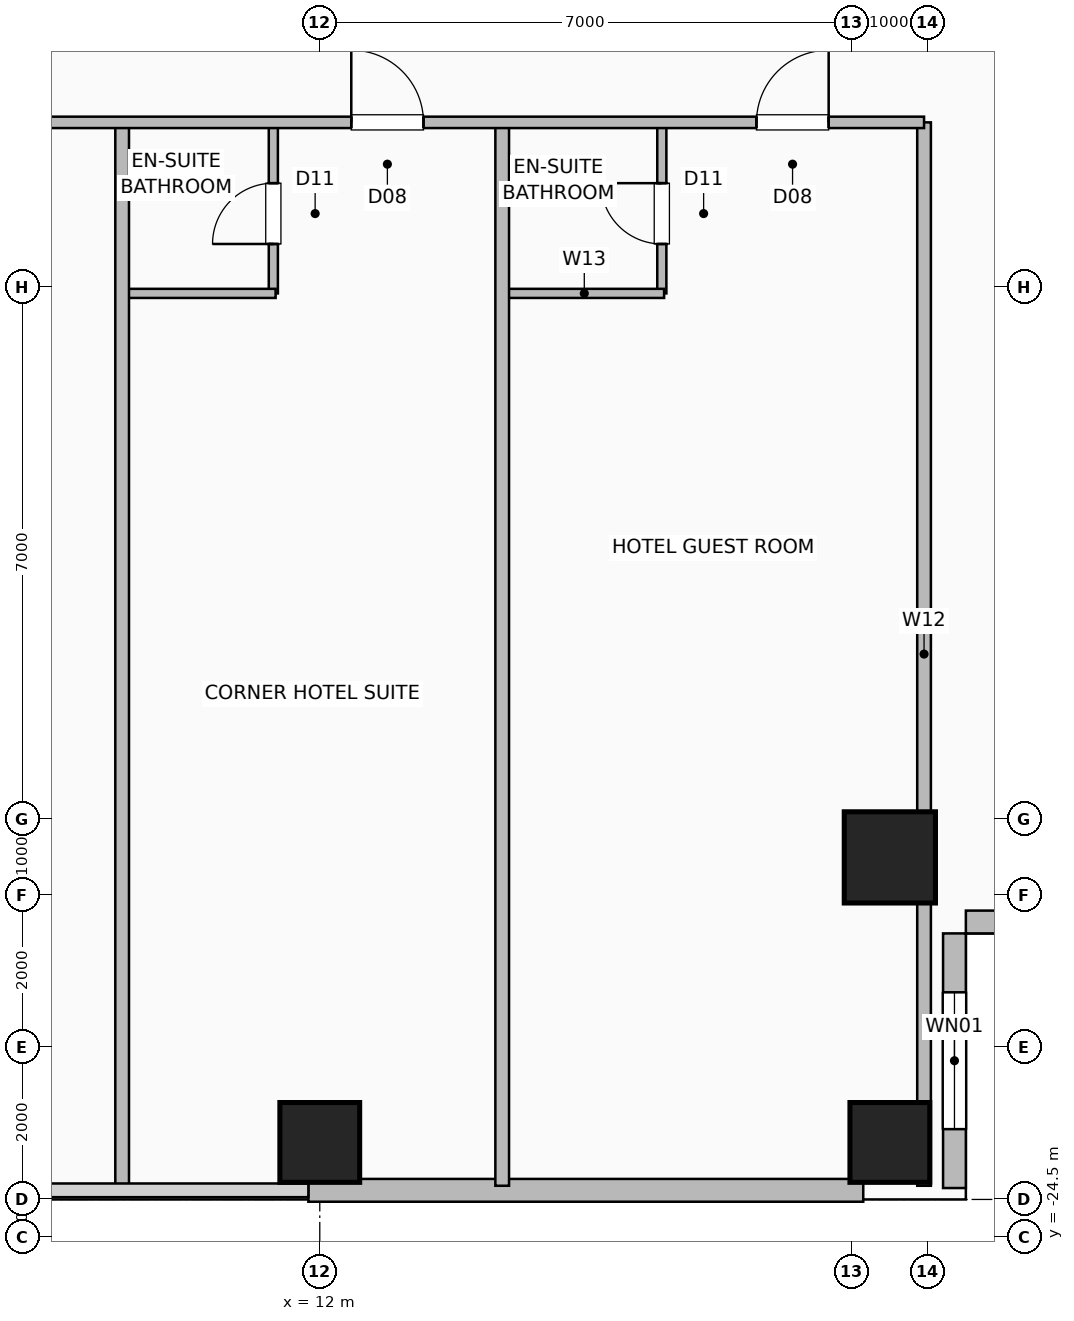
"""IFC4 building model, lengths in metres.
Left out: names, types, materials, properties, quantities, classifications, styles, units other than length and angle.
Written with IfcOpenShell. Run it as: python <this file> out.ifc"""

import sys

from ifc_helpers import new_model, si_unit, direction, frame, frame_2d, origin, origin_2d, place, context, subcontext, project, spatial, rectangle, hollow_rectangle, extrude, element, fill, save


model = new_model("IFC4")
c1 = context("Model", 3, precision=1e-05, world=origin(), true_north=direction((0.0, 1.0)))
c2 = subcontext(c1, "Body", "Model", "MODEL_VIEW")
j1 = project(units=[si_unit("LENGTHUNIT", "METRE"), si_unit("PLANEANGLEUNIT", "RADIAN")], contexts=[c1])
p1 = place(None, origin())
s1 = spatial("IfcSite", under=j1, at=p1, CompositionType="ELEMENT")
p2 = place(p1, origin())
s2 = spatial("IfcBuilding", under=s1, at=p2, CompositionType="ELEMENT")
p3 = place(p2, frame((0.0, 0.0, 65.5)))
s3 = spatial("IfcBuildingStorey", under=s2, at=p3, CompositionType="ELEMENT", Elevation=65.5)
for number, where, z_axis, x_axis in (
    (1, (12.0, -23.25, 0.0), (0.0, 0.0, 1.0), (1.0, 0.0, 0.0)),
    (2, (19.5, -23.25, 0.0), (0.0, 0.0, 1.0), (1.0, 0.0, 0.0)),
):
    element("IfcColumn", number, at=place(p3, frame(where, z_axis=z_axis, x_axis=x_axis)), inside=s3, PredefinedType="COLUMN", context=c2, shape_type="SweptSolid", body=[
        extrude(hollow_rectangle(XDim=1.05, YDim=1.05, WallThickness=0.05, at=origin_2d()), origin(), (0.0, 0.0, 1.0), 3.5),
    ])
p4 = place(p3, frame((19.5, -19.5, 0.0), z_axis=(0.0, 0.0, 1.0), x_axis=(1.0, 0.0, 0.0)))
e3 = element("IfcColumn", 3, at=p4, inside=s3, PredefinedType="COLUMN", context=c2, shape_type="SweptSolid", body=[
    extrude(hollow_rectangle(XDim=1.2, YDim=1.2, WallThickness=0.055, at=origin_2d()), origin(), (0.0, 0.0, 1.0), 3.5),
])
p5 = place(p3, frame((11.85, -23.88, 0.0), z_axis=(0.0, 0.0, 1.0), x_axis=(1.0, 0.0, 0.0)))
e4 = element("IfcWall", 4, at=p5, inside=s3, PredefinedType="SOLIDWALL", context=c2, shape_type="SweptSolid", body=[
    extrude(rectangle(XDim=7.3, YDim=0.3, at=frame_2d((3.65, 0.0))), origin(), (0.0, 0.0, 1.0), 3.25),
])
p6 = place(p3, frame((20.35, -23.85, 0.0), z_axis=(0.0, 0.0, 1.0), x_axis=(0.0, 1.0, 0.0)))
e5 = element("IfcWall", 5, at=p6, inside=s3, PredefinedType="SOLIDWALL", context=c2, shape_type="SweptSolid", body=[
    extrude(rectangle(XDim=3.35, YDim=0.3, at=frame_2d((1.675, 0.0))), origin(), (0.0, 0.0, 1.0), 3.25),
])
p7 = place(p6, frame((0.775, 0.0, 0.9)))
e6 = element("IfcOpeningElement", 6, at=p7, cuts=e5, PredefinedType="OPENING", context=c2, shape_type="SweptSolid", body=[
    extrude(rectangle(XDim=1.8, YDim=1.8, at=frame_2d((0.9, 0.9))), frame((0.0, 0.16, 0.0), z_axis=(0.0, -1.0, 0.0), x_axis=(1.0, 0.0, 0.0)), (0.0, 0.0, 1.0), 0.32),
])
p8 = place(p3, frame((23.85, -20.35, 0.0), z_axis=(0.0, 0.0, 1.0), x_axis=(-1.0, 0.0, 0.0)))
e7 = element("IfcWall", 7, at=p8, inside=s3, PredefinedType="SOLIDWALL", context=c2, shape_type="SweptSolid", body=[
    extrude(rectangle(XDim=3.35, YDim=0.3, at=frame_2d((1.675, 0.0))), origin(), (0.0, 0.0, 1.0), 3.25),
])
p9 = place(p3, frame((11.389, -12.08, 0.0), z_axis=(0.0, 0.0, 1.0), x_axis=(0.0, 1.0, 0.0)))
e8 = element("IfcWall", 8, at=p9, inside=s3, PredefinedType="PLUMBINGWALL", context=c2, shape_type="SweptSolid", body=[
    extrude(rectangle(XDim=2.25, YDim=0.12, at=frame_2d((1.125, 0.0))), origin(), (0.0, 0.0, 1.0), 3.25),
])
p10 = place(p9, frame((0.65, 0.0, 0.0)))
e9 = element("IfcOpeningElement", 9, at=p10, cuts=e8, PredefinedType="OPENING", context=c2, shape_type="SweptSolid", body=[
    extrude(rectangle(XDim=0.8, YDim=2.05, at=frame_2d((0.4, 1.025))), frame((0.0, 0.07, 0.0), z_axis=(0.0, -1.0, 0.0), x_axis=(1.0, 0.0, 0.0)), (0.0, 0.0, 1.0), 0.14),
])
p11 = place(p3, frame((9.43, -12.08, 0.0), z_axis=(0.0, 0.0, 1.0), x_axis=(1.0, 0.0, 0.0)))
e10 = element("IfcWall", 10, at=p11, inside=s3, PredefinedType="PLUMBINGWALL", context=c2, shape_type="SweptSolid", body=[
    extrude(rectangle(XDim=1.989, YDim=0.12, at=frame_2d((0.995, 0.0))), origin(), (0.0, 0.0, 1.0), 3.25),
])
p12 = place(p3, frame((16.5, -12.08, 0.0), z_axis=(0.0, 0.0, 1.0), x_axis=(0.0, 1.0, 0.0)))
e11 = element("IfcWall", 11, at=p12, inside=s3, PredefinedType="PLUMBINGWALL", context=c2, shape_type="SweptSolid", body=[
    extrude(rectangle(XDim=2.25, YDim=0.12, at=frame_2d((1.125, 0.0))), origin(), (0.0, 0.0, 1.0), 3.25),
])
p13 = place(p12, frame((0.65, 0.0, 0.0)))
e12 = element("IfcOpeningElement", 12, at=p13, cuts=e11, PredefinedType="OPENING", context=c2, shape_type="SweptSolid", body=[
    extrude(rectangle(XDim=0.8, YDim=2.05, at=frame_2d((0.4, 1.025))), frame((0.0, 0.07, 0.0), z_axis=(0.0, -1.0, 0.0), x_axis=(1.0, 0.0, 0.0)), (0.0, 0.0, 1.0), 0.14),
])
p14 = place(p3, frame((14.43, -12.08, 0.0), z_axis=(0.0, 0.0, 1.0), x_axis=(1.0, 0.0, 0.0)))
e13 = element("IfcWall", 13, at=p14, inside=s3, PredefinedType="PLUMBINGWALL", context=c2, shape_type="SweptSolid", body=[
    extrude(rectangle(XDim=2.1, YDim=0.12, at=frame_2d((1.05, 0.0))), origin(), (0.0, 0.0, 1.0), 3.25),
])
for number, where, z_axis, x_axis in (
    (14, (9.4, -23.82, 0.0), (0.0, 0.0, 1.0), (0.0, 1.0, 0.0)),
    (15, (14.4, -23.82, 0.0), (0.0, 0.0, 1.0), (0.0, 1.0, 0.0)),
    (16, (19.95, -23.82, 0.0), (0.0, 0.0, 1.0), (0.0, 1.0, 0.0)),
):
    element("IfcWall", number, at=place(p3, frame(where, z_axis=z_axis, x_axis=x_axis)), inside=s3, PredefinedType="PARTITIONING", context=c2, shape_type="SweptSolid", body=[
        extrude(rectangle(XDim=13.99, YDim=0.18, at=frame_2d((6.995, 0.0))), origin(), (0.0, 0.0, 1.0), 3.25),
    ])
p15 = place(p3, frame((-19.95, -9.83, 0.0), z_axis=(0.0, 0.0, 1.0), x_axis=(1.0, 0.0, 0.0)))
e17 = element("IfcWall", 17, at=p15, inside=s3, PredefinedType="PARTITIONING", context=c2, shape_type="SweptSolid", body=[
    extrude(rectangle(XDim=39.9, YDim=0.15, at=frame_2d((19.95, 0.0))), origin(), (0.0, 0.0, 1.0), 3.25),
])
p16 = place(p15, frame((3.245, 0.0, 0.0)))
e18 = element("IfcOpeningElement", 18, at=p16, cuts=e17, PredefinedType="OPENING", context=c2, shape_type="SweptSolid", body=[
    extrude(rectangle(XDim=0.95, YDim=2.08, at=frame_2d((0.475, 1.04))), frame((0.0, 0.085, 0.0), z_axis=(0.0, -1.0, 0.0), x_axis=(1.0, 0.0, 0.0)), (0.0, 0.0, 1.0), 0.17),
])
p17 = place(p15, frame((8.227, 0.0, 0.0)))
e19 = element("IfcOpeningElement", 19, at=p17, cuts=e17, PredefinedType="OPENING", context=c2, shape_type="SweptSolid", body=[
    extrude(rectangle(XDim=0.95, YDim=2.08, at=frame_2d((0.475, 1.04))), frame((0.0, 0.085, 0.0), z_axis=(0.0, -1.0, 0.0), x_axis=(1.0, 0.0, 0.0)), (0.0, 0.0, 1.0), 0.17),
])
p18 = place(p15, frame((13.027, 0.0, 0.0)))
e20 = element("IfcOpeningElement", 20, at=p18, cuts=e17, PredefinedType="OPENING", context=c2, shape_type="SweptSolid", body=[
    extrude(rectangle(XDim=0.95, YDim=2.08, at=frame_2d((0.475, 1.04))), frame((0.0, 0.085, 0.0), z_axis=(0.0, -1.0, 0.0), x_axis=(1.0, 0.0, 0.0)), (0.0, 0.0, 1.0), 0.17),
])
p19 = place(p15, frame((16.861, 0.0, 0.0)))
e21 = element("IfcOpeningElement", 21, at=p19, cuts=e17, PredefinedType="OPENING", context=c2, shape_type="SweptSolid", body=[
    extrude(rectangle(XDim=0.95, YDim=2.08, at=frame_2d((0.475, 1.04))), frame((0.0, 0.085, 0.0), z_axis=(0.0, -1.0, 0.0), x_axis=(1.0, 0.0, 0.0)), (0.0, 0.0, 1.0), 0.17),
])
p20 = place(p15, frame((22.02, 0.0, 0.0)))
e22 = element("IfcOpeningElement", 22, at=p20, cuts=e17, PredefinedType="OPENING", context=c2, shape_type="SweptSolid", body=[
    extrude(rectangle(XDim=0.95, YDim=2.08, at=frame_2d((0.475, 1.04))), frame((0.0, 0.085, 0.0), z_axis=(0.0, -1.0, 0.0), x_axis=(1.0, 0.0, 0.0)), (0.0, 0.0, 1.0), 0.17),
])
p21 = place(p15, frame((27.427, 0.0, 0.0)))
e23 = element("IfcOpeningElement", 23, at=p21, cuts=e17, PredefinedType="OPENING", context=c2, shape_type="SweptSolid", body=[
    extrude(rectangle(XDim=0.95, YDim=2.08, at=frame_2d((0.475, 1.04))), frame((0.0, 0.085, 0.0), z_axis=(0.0, -1.0, 0.0), x_axis=(1.0, 0.0, 0.0)), (0.0, 0.0, 1.0), 0.17),
])
p22 = place(p15, frame((32.365, 0.0, 0.0)))
e24 = element("IfcOpeningElement", 24, at=p22, cuts=e17, PredefinedType="OPENING", context=c2, shape_type="SweptSolid", body=[
    extrude(rectangle(XDim=0.95, YDim=2.08, at=frame_2d((0.475, 1.04))), frame((0.0, 0.085, 0.0), z_axis=(0.0, -1.0, 0.0), x_axis=(1.0, 0.0, 0.0)), (0.0, 0.0, 1.0), 0.17),
])
p23 = place(p15, frame((37.695, 0.0, 0.0)))
e25 = element("IfcOpeningElement", 25, at=p23, cuts=e17, PredefinedType="OPENING", context=c2, shape_type="SweptSolid", body=[
    extrude(rectangle(XDim=0.95, YDim=2.08, at=frame_2d((0.475, 1.04))), frame((0.0, 0.085, 0.0), z_axis=(0.0, -1.0, 0.0), x_axis=(1.0, 0.0, 0.0)), (0.0, 0.0, 1.0), 0.17),
])
p24 = place(p7, origin())
e26 = element("IfcWindow", 26, at=p24, inside=s3, PartitioningType="SINGLE_PANEL", PredefinedType="WINDOW", context=c2, shape_type="SweptSolid", body=[
    extrude(rectangle(XDim=1.8, YDim=1.8, at=frame_2d((0.9, 0.9))), frame((0.0, 0.03, 0.0), z_axis=(0.0, -1.0, 0.0), x_axis=(1.0, 0.0, 0.0)), (0.0, 0.0, 1.0), 0.06),
])
fill(e6, e26)
p25 = place(p10, origin())
e27 = element("IfcDoor", 27, at=p25, inside=s3, OperationType="SINGLE_SWING_LEFT", PredefinedType="DOOR", context=c2, shape_type="SweptSolid", body=[
    extrude(rectangle(XDim=0.8, YDim=2.05, at=frame_2d((0.4, 1.025))), frame((0.0, 0.025, 0.0), z_axis=(0.0, -1.0, 0.0), x_axis=(1.0, 0.0, 0.0)), (0.0, 0.0, 1.0), 0.05),
])
fill(e9, e27)
p26 = place(p13, origin())
e28 = element("IfcDoor", 28, at=p26, inside=s3, OperationType="SINGLE_SWING_RIGHT", PredefinedType="DOOR", context=c2, shape_type="SweptSolid", body=[
    extrude(rectangle(XDim=0.8, YDim=2.05, at=frame_2d((0.4, 1.025))), frame((0.0, 0.025, 0.0), z_axis=(0.0, -1.0, 0.0), x_axis=(1.0, 0.0, 0.0)), (0.0, 0.0, 1.0), 0.05),
])
fill(e12, e28)
p27 = place(p22, origin())
e29 = element("IfcDoor", 29, at=p27, inside=s3, OperationType="SINGLE_SWING_LEFT", PredefinedType="DOOR", context=c2, shape_type="SweptSolid", body=[
    extrude(rectangle(XDim=0.95, YDim=2.08, at=frame_2d((0.475, 1.04))), frame((0.0, 0.025, 0.0), z_axis=(0.0, -1.0, 0.0), x_axis=(1.0, 0.0, 0.0)), (0.0, 0.0, 1.0), 0.05),
])
fill(e24, e29)
p28 = place(p23, origin())
e30 = element("IfcDoor", 30, at=p28, inside=s3, OperationType="SINGLE_SWING_RIGHT", PredefinedType="DOOR", context=c2, shape_type="SweptSolid", body=[
    extrude(rectangle(XDim=0.95, YDim=2.08, at=frame_2d((0.475, 1.04))), frame((0.0, 0.025, 0.0), z_axis=(0.0, -1.0, 0.0), x_axis=(1.0, 0.0, 0.0)), (0.0, 0.0, 1.0), 0.05),
])
fill(e25, e30)
save(model, sys.argv[1])
